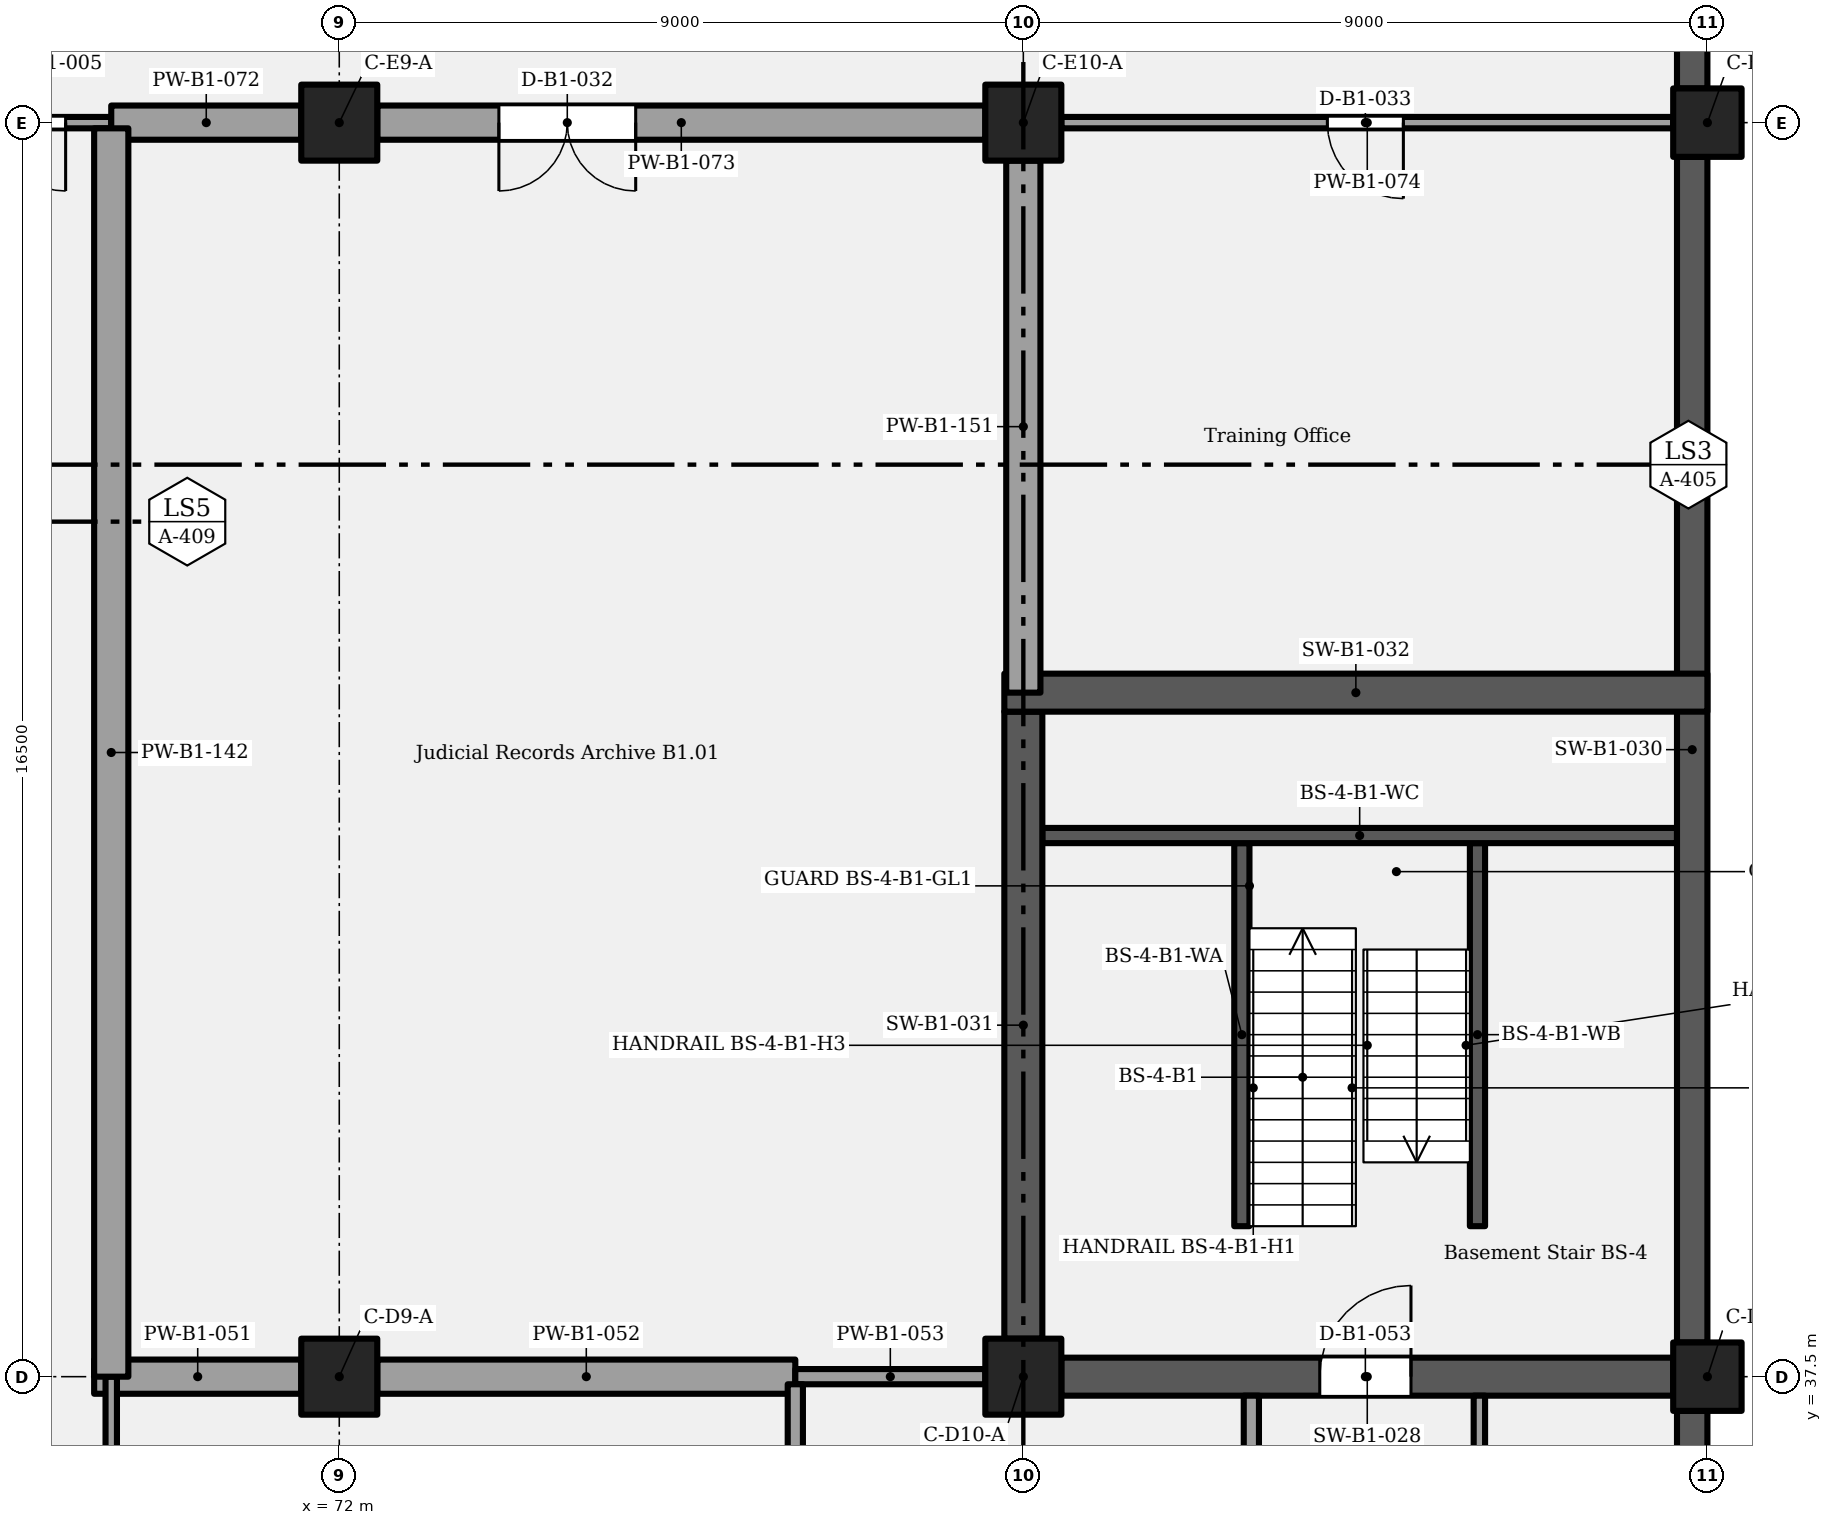
"""IFC4 building model, lengths in metres.
Left out: names, types, materials, properties, quantities, classifications, styles, units other than length and angle.
Written with IfcOpenShell. Run it as: python <this file> out.ifc"""

import sys

from ifc_helpers import new_model, si_unit, direction, frame, frame_2d, origin, origin_2d, place, context, subcontext, project, spatial, rectangle, extrude, element, fill, save


model = new_model("IFC4")
c1 = context("Model", 3, precision=1e-05, world=origin(), true_north=direction((0.0, 1.0)))
c2 = subcontext(c1, "Body", "Model", "MODEL_VIEW")
j1 = project(units=[si_unit("LENGTHUNIT", "METRE"), si_unit("PLANEANGLEUNIT", "RADIAN")], contexts=[c1])
p1 = place(None, origin())
s1 = spatial("IfcSite", under=j1, at=p1, CompositionType="ELEMENT")
p2 = place(p1, origin())
s2 = spatial("IfcBuilding", under=s1, at=p2, CompositionType="ELEMENT")
p3 = place(p2, frame((0.0, 0.0, -4.2)))
s3 = spatial("IfcBuildingStorey", under=s2, at=p3, CompositionType="ELEMENT", Elevation=-4.2)
for number, where, z_axis, x_axis in (
    (1, (72.0, 37.5, 0.0), (0.0, 0.0, 1.0), (1.0, 0.0, 0.0)),
    (2, (81.0, 37.5, 0.0), (0.0, 0.0, 1.0), (1.0, 0.0, 0.0)),
):
    element("IfcColumn", number, at=place(p3, frame(where, z_axis=z_axis, x_axis=x_axis)), inside=s3, PredefinedType="COLUMN", context=c2, shape_type="SweptSolid", body=[
        extrude(rectangle(XDim=1.0, YDim=1.0, at=origin_2d()), origin(), (0.0, 0.0, 1.0), 4.2),
    ])
p4 = place(p3, frame((90.0, 37.5, 0.0), z_axis=(0.0, 0.0, 1.0), x_axis=(1.0, 0.0, 0.0)))
e3 = element("IfcColumn", 3, at=p4, inside=s3, PredefinedType="COLUMN", context=c2, shape_type="SweptSolid", body=[
    extrude(rectangle(XDim=0.9, YDim=0.9, at=origin_2d()), origin(), (0.0, 0.0, 1.0), 4.2),
])
for number, where, z_axis, x_axis in (
    (4, (72.0, 54.0, 0.0), (0.0, 0.0, 1.0), (1.0, 0.0, 0.0)),
    (5, (81.0, 54.0, 0.0), (0.0, 0.0, 1.0), (1.0, 0.0, 0.0)),
):
    element("IfcColumn", number, at=place(p3, frame(where, z_axis=z_axis, x_axis=x_axis)), inside=s3, PredefinedType="COLUMN", context=c2, shape_type="SweptSolid", body=[
        extrude(rectangle(XDim=1.0, YDim=1.0, at=origin_2d()), origin(), (0.0, 0.0, 1.0), 4.2),
    ])
p5 = place(p3, frame((90.0, 54.0, 0.0), z_axis=(0.0, 0.0, 1.0), x_axis=(1.0, 0.0, 0.0)))
e6 = element("IfcColumn", 6, at=p5, inside=s3, PredefinedType="COLUMN", context=c2, shape_type="SweptSolid", body=[
    extrude(rectangle(XDim=0.9, YDim=0.9, at=origin_2d()), origin(), (0.0, 0.0, 1.0), 4.2),
])
p6 = place(p3, frame((89.8, 28.95, 0.0), z_axis=(0.0, 0.0, 1.0), x_axis=(0.0, 1.0, 0.0)))
e7 = element("IfcWall", 7, at=p6, inside=s3, PredefinedType="SOLIDWALL", context=c2, shape_type="SweptSolid", body=[
    extrude(rectangle(XDim=8.1, YDim=0.4, at=frame_2d((4.05, 0.0))), origin(), (0.0, 0.0, 1.0), 3.9),
])
p7 = place(p3, frame((81.5, 37.5, 0.0), z_axis=(0.0, 0.0, 1.0), x_axis=(1.0, 0.0, 0.0)))
e8 = element("IfcWall", 8, at=p7, inside=s3, PredefinedType="SHEAR", context=c2, shape_type="SweptSolid", body=[
    extrude(rectangle(XDim=8.05, YDim=0.5, at=frame_2d((4.025, 0.0))), origin(), (0.0, 0.0, 1.0), 3.9),
])
p8 = place(p7, frame((3.4, 0.0, 0.0)))
e9 = element("IfcOpeningElement", 9, at=p8, cuts=e8, PredefinedType="OPENING", context=c2, shape_type="SweptSolid", body=[
    extrude(rectangle(XDim=1.2, YDim=2.1, at=frame_2d((0.6, 1.05))), frame((0.0, 0.26, 0.0), z_axis=(0.0, -1.0, 0.0), x_axis=(1.0, 0.0, 0.0)), (0.0, 0.0, 1.0), 0.52),
])
p9 = place(p3, frame((89.8, 37.95, 0.0), z_axis=(0.0, 0.0, 1.0), x_axis=(0.0, 1.0, 0.0)))
e10 = element("IfcWall", 10, at=p9, inside=s3, PredefinedType="SOLIDWALL", context=c2, shape_type="SweptSolid", body=[
    extrude(rectangle(XDim=15.6, YDim=0.4, at=frame_2d((7.8, 0.0))), origin(), (0.0, 0.0, 1.0), 3.9),
])
p10 = place(p3, frame((81.0, 38.0, 0.0), z_axis=(0.0, 0.0, 1.0), x_axis=(0.0, 1.0, 0.0)))
e11 = element("IfcWall", 11, at=p10, inside=s3, PredefinedType="SHEAR", context=c2, shape_type="SweptSolid", body=[
    extrude(rectangle(XDim=8.25, YDim=0.5, at=frame_2d((4.125, 0.0))), origin(), (0.0, 0.0, 1.0), 3.9),
])
p11 = place(p3, frame((80.75, 46.5, 0.0), z_axis=(0.0, 0.0, 1.0), x_axis=(1.0, 0.0, 0.0)))
e12 = element("IfcWall", 12, at=p11, inside=s3, PredefinedType="SHEAR", context=c2, shape_type="SweptSolid", body=[
    extrude(rectangle(XDim=9.25, YDim=0.5, at=frame_2d((4.625, 0.0))), origin(), (0.0, 0.0, 1.0), 3.9),
])
p12 = place(p3, frame((89.8, 54.45, 0.0), z_axis=(0.0, 0.0, 1.0), x_axis=(0.0, 1.0, 0.0)))
e13 = element("IfcWall", 13, at=p12, inside=s3, PredefinedType="SOLIDWALL", context=c2, shape_type="SweptSolid", body=[
    extrude(rectangle(XDim=11.1, YDim=0.4, at=frame_2d((5.55, 0.0))), origin(), (0.0, 0.0, 1.0), 3.9),
])
p13 = place(p3, frame((68.775, 37.5, 0.0), z_axis=(0.0, 0.0, 1.0), x_axis=(1.0, 0.0, 0.0)))
e14 = element("IfcWall", 14, at=p13, inside=s3, PredefinedType="PARTITIONING", context=c2, shape_type="SweptSolid", body=[
    extrude(rectangle(XDim=2.725, YDim=0.45, at=frame_2d((1.363, 0.0))), origin(), (0.0, 0.0, 1.0), 3.15),
])
p14 = place(p3, frame((72.5, 37.5, 0.0), z_axis=(0.0, 0.0, 1.0), x_axis=(1.0, 0.0, 0.0)))
e15 = element("IfcWall", 15, at=p14, inside=s3, PredefinedType="PARTITIONING", context=c2, shape_type="SweptSolid", body=[
    extrude(rectangle(XDim=5.5, YDim=0.45, at=frame_2d((2.75, 0.0))), origin(), (0.0, 0.0, 1.0), 3.15),
])
p15 = place(p3, frame((78.0, 37.5, 0.0), z_axis=(0.0, 0.0, 1.0), x_axis=(1.0, 0.0, 0.0)))
e16 = element("IfcWall", 16, at=p15, inside=s3, PredefinedType="PARTITIONING", context=c2, shape_type="SweptSolid", body=[
    extrude(rectangle(XDim=2.5, YDim=0.2, at=frame_2d((1.25, 0.0))), origin(), (0.0, 0.0, 1.0), 3.15),
])
p16 = place(p3, frame((66.0, 54.0, 0.0), z_axis=(0.0, 0.0, 1.0), x_axis=(1.0, 0.0, 0.0)))
e17 = element("IfcWall", 17, at=p16, inside=s3, PredefinedType="PARTITIONING", context=c2, shape_type="SweptSolid", body=[
    extrude(rectangle(XDim=3.0, YDim=0.15, at=frame_2d((1.5, 0.0))), origin(), (0.0, 0.0, 1.0), 3.15),
])
p17 = place(p16, frame((2.4, 0.0, 0.0), z_axis=(0.0, 0.0, 1.0), x_axis=(-1.0, 0.0, 0.0)))
e18 = element("IfcOpeningElement", 18, at=p17, cuts=e17, PredefinedType="OPENING", context=c2, shape_type="SweptSolid", body=[
    extrude(rectangle(XDim=1.8, YDim=2.1, at=frame_2d((0.9, 1.05))), frame((0.0, 0.085, 0.0), z_axis=(0.0, -1.0, 0.0), x_axis=(1.0, 0.0, 0.0)), (0.0, 0.0, 1.0), 0.17),
])
p18 = place(p3, frame((69.0, 54.0, 0.0), z_axis=(0.0, 0.0, 1.0), x_axis=(1.0, 0.0, 0.0)))
e19 = element("IfcWall", 19, at=p18, inside=s3, PredefinedType="PARTITIONING", context=c2, shape_type="SweptSolid", body=[
    extrude(rectangle(XDim=2.5, YDim=0.45, at=frame_2d((1.25, 0.0))), origin(), (0.0, 0.0, 1.0), 3.15),
])
p19 = place(p3, frame((72.5, 54.0, 0.0), z_axis=(0.0, 0.0, 1.0), x_axis=(1.0, 0.0, 0.0)))
e20 = element("IfcWall", 20, at=p19, inside=s3, PredefinedType="PARTITIONING", context=c2, shape_type="SweptSolid", body=[
    extrude(rectangle(XDim=8.0, YDim=0.45, at=frame_2d((4.0, 0.0))), origin(), (0.0, 0.0, 1.0), 3.15),
])
p20 = place(p19, frame((3.4, 0.0, 0.0), z_axis=(0.0, 0.0, 1.0), x_axis=(-1.0, 0.0, 0.0)))
e21 = element("IfcOpeningElement", 21, at=p20, cuts=e20, PredefinedType="OPENING", context=c2, shape_type="SweptSolid", body=[
    extrude(rectangle(XDim=1.8, YDim=2.4, at=frame_2d((0.9, 1.2))), frame((0.0, 0.235, 0.0), z_axis=(0.0, -1.0, 0.0), x_axis=(1.0, 0.0, 0.0)), (0.0, 0.0, 1.0), 0.47),
])
p21 = place(p3, frame((81.5, 54.0, 0.0), z_axis=(0.0, 0.0, 1.0), x_axis=(1.0, 0.0, 0.0)))
e22 = element("IfcWall", 22, at=p21, inside=s3, PredefinedType="PARTITIONING", context=c2, shape_type="SweptSolid", body=[
    extrude(rectangle(XDim=8.05, YDim=0.15, at=frame_2d((4.025, 0.0))), origin(), (0.0, 0.0, 1.0), 3.15),
])
p22 = place(p21, frame((4.5, 0.0, 0.0), z_axis=(0.0, 0.0, 1.0), x_axis=(-1.0, 0.0, 0.0)))
e23 = element("IfcOpeningElement", 23, at=p22, cuts=e22, PredefinedType="OPENING", context=c2, shape_type="SweptSolid", body=[
    extrude(rectangle(XDim=1.0, YDim=2.1, at=frame_2d((0.5, 1.05))), frame((0.0, 0.085, 0.0), z_axis=(0.0, -1.0, 0.0), x_axis=(1.0, 0.0, 0.0)), (0.0, 0.0, 1.0), 0.17),
])
p23 = place(p3, frame((69.0, 12.075, 0.0), z_axis=(0.0, 0.0, 1.0), x_axis=(0.0, 1.0, 0.0)))
e24 = element("IfcWall", 24, at=p23, inside=s3, PredefinedType="PARTITIONING", context=c2, shape_type="SweptSolid", body=[
    extrude(rectangle(XDim=25.425, YDim=0.15, at=frame_2d((12.712, 0.0))), origin(), (0.0, 0.0, 1.0), 3.9),
])
p24 = place(p23, frame((17.025, 0.0, 0.0)))
e25 = element("IfcOpeningElement", 25, at=p24, cuts=e24, PredefinedType="OPENING", context=c2, shape_type="SweptSolid", body=[
    extrude(rectangle(XDim=1.8, YDim=2.1, at=frame_2d((0.9, 1.05))), frame((0.0, 0.085, 0.0), z_axis=(0.0, -1.0, 0.0), x_axis=(1.0, 0.0, 0.0)), (0.0, 0.0, 1.0), 0.17),
])
p25 = place(p3, frame((69.0, 37.5, 0.0), z_axis=(0.0, 0.0, 1.0), x_axis=(0.0, 1.0, 0.0)))
e26 = element("IfcWall", 26, at=p25, inside=s3, PredefinedType="PARTITIONING", context=c2, shape_type="SweptSolid", body=[
    extrude(rectangle(XDim=16.425, YDim=0.45, at=frame_2d((8.212, 0.0))), origin(), (0.0, 0.0, 1.0), 3.9),
])
p26 = place(p3, frame((78.0, 31.575, 0.0), z_axis=(0.0, 0.0, 1.0), x_axis=(0.0, 1.0, 0.0)))
e27 = element("IfcWall", 27, at=p26, inside=s3, PredefinedType="PARTITIONING", context=c2, shape_type="SweptSolid", body=[
    extrude(rectangle(XDim=5.825, YDim=0.2, at=frame_2d((2.913, 0.0))), origin(), (0.0, 0.0, 1.0), 3.9),
])
p27 = place(p3, frame((81.0, 46.5, 0.0), z_axis=(0.0, 0.0, 1.0), x_axis=(0.0, 1.0, 0.0)))
e28 = element("IfcWall", 28, at=p27, inside=s3, PredefinedType="PARTITIONING", context=c2, shape_type="SweptSolid", body=[
    extrude(rectangle(XDim=7.0, YDim=0.45, at=frame_2d((3.5, 0.0))), origin(), (0.0, 0.0, 1.0), 2.95),
])
p28 = place(p3, frame((84.0, 31.6, 0.0), z_axis=(0.0, 0.0, 1.0), x_axis=(0.0, 1.0, 0.0)))
e29 = element("IfcWall", 29, at=p28, inside=s3, PredefinedType="PARTITIONING", context=c2, shape_type="SweptSolid", body=[
    extrude(rectangle(XDim=5.65, YDim=0.2, at=frame_2d((2.825, 0.0))), origin(), (0.0, 0.0, 1.0), 3.9),
])
p29 = place(p3, frame((87.0, 31.575, 0.0), z_axis=(0.0, 0.0, 1.0), x_axis=(0.0, 1.0, 0.0)))
e30 = element("IfcWall", 30, at=p29, inside=s3, PredefinedType="PARTITIONING", context=c2, shape_type="SweptSolid", body=[
    extrude(rectangle(XDim=5.675, YDim=0.15, at=frame_2d((2.837, 0.0))), origin(), (0.0, 0.0, 1.0), 3.9),
])
for number, where, z_axis, x_axis in (
    (31, (83.875, 39.48, 0.0), (0.0, 0.0, 1.0), (0.0, 1.0, 0.0)),
    (32, (86.975, 39.48, 0.0), (0.0, 0.0, 1.0), (0.0, 1.0, 0.0)),
):
    element("IfcWall", number, at=place(p3, frame(where, z_axis=z_axis, x_axis=x_axis)), inside=s3, PredefinedType="SHEAR", context=c2, shape_type="SweptSolid", body=[
        extrude(rectangle(XDim=5.04, YDim=0.2, at=frame_2d((2.52, 0.0))), origin(), (0.0, 0.0, 1.0), 3.9),
    ])
p30 = place(p3, frame((81.25, 44.62, 0.0), z_axis=(0.0, 0.0, 1.0), x_axis=(1.0, 0.0, 0.0)))
e33 = element("IfcWall", 33, at=p30, inside=s3, PredefinedType="SHEAR", context=c2, shape_type="SweptSolid", body=[
    extrude(rectangle(XDim=8.35, YDim=0.2, at=frame_2d((4.175, 0.0))), origin(), (0.0, 0.0, 1.0), 3.9),
])
p31 = place(p17, origin())
e34 = element("IfcDoor", 34, at=p31, inside=s3, OperationType="DOUBLE_DOOR_SINGLE_SWING", PredefinedType="DOOR", context=c2, shape_type="SweptSolid", body=[
    extrude(rectangle(XDim=1.8, YDim=2.1, at=frame_2d((0.9, 1.05))), frame((0.0, 0.025, 0.0), z_axis=(0.0, -1.0, 0.0), x_axis=(1.0, 0.0, 0.0)), (0.0, 0.0, 1.0), 0.05),
])
fill(e18, e34)
p32 = place(p20, origin())
e35 = element("IfcDoor", 35, at=p32, inside=s3, OperationType="DOUBLE_DOOR_SINGLE_SWING", PredefinedType="DOOR", context=c2, shape_type="SweptSolid", body=[
    extrude(rectangle(XDim=1.8, YDim=2.4, at=frame_2d((0.9, 1.2))), frame((0.0, 0.025, 0.0), z_axis=(0.0, -1.0, 0.0), x_axis=(1.0, 0.0, 0.0)), (0.0, 0.0, 1.0), 0.05),
])
fill(e21, e35)
p33 = place(p22, origin())
e36 = element("IfcDoor", 36, at=p33, inside=s3, OperationType="SINGLE_SWING_LEFT", PredefinedType="DOOR", context=c2, shape_type="SweptSolid", body=[
    extrude(rectangle(XDim=1.0, YDim=2.1, at=frame_2d((0.5, 1.05))), frame((0.0, 0.025, 0.0), z_axis=(0.0, -1.0, 0.0), x_axis=(1.0, 0.0, 0.0)), (0.0, 0.0, 1.0), 0.05),
])
fill(e23, e36)
p34 = place(p8, origin())
e37 = element("IfcDoor", 37, at=p34, inside=s3, OperationType="SINGLE_SWING_RIGHT", PredefinedType="DOOR", context=c2, shape_type="SweptSolid", body=[
    extrude(rectangle(XDim=1.2, YDim=2.1, at=frame_2d((0.6, 1.05))), frame((0.0, 0.025, 0.0), z_axis=(0.0, -1.0, 0.0), x_axis=(1.0, 0.0, 0.0)), (0.0, 0.0, 1.0), 0.05),
])
fill(e9, e37)
save(model, sys.argv[1])
